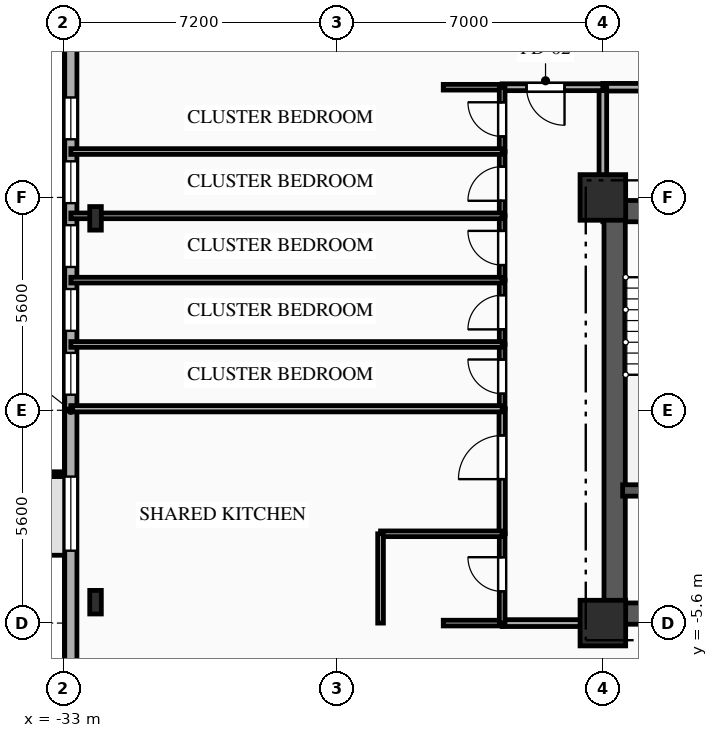
"""IFC4 building model, lengths in metres.
Left out: names, types, materials, properties, quantities, classifications, styles, units other than length and angle.
Written with IfcOpenShell. Run it as: python <this file> out.ifc"""

import sys

from ifc_helpers import new_model, si_unit, direction, frame, frame_2d, origin, origin_2d, place, context, subcontext, project, spatial, rectangle, i_section, extrude, element, fill, save


model = new_model("IFC4")
c1 = context("Model", 3, precision=1e-05, world=origin(), true_north=direction((0.0, 1.0)))
c2 = subcontext(c1, "Body", "Model", "MODEL_VIEW")
j1 = project(units=[si_unit("LENGTHUNIT", "METRE"), si_unit("PLANEANGLEUNIT", "RADIAN")], contexts=[c1])
p1 = place(None, origin())
s1 = spatial("IfcSite", under=j1, at=p1, CompositionType="ELEMENT")
p2 = place(p1, origin())
s2 = spatial("IfcBuilding", under=s1, at=p2, CompositionType="ELEMENT")
p3 = place(p2, frame((0.0, 0.0, 57.15)))
s3 = spatial("IfcBuildingStorey", under=s2, at=p3, CompositionType="ELEMENT", Elevation=57.15)
for number, where, z_axis, x_axis in (
    (1, (-18.8, -5.6, 0.0), (0.0, 0.0, 1.0), (1.0, 0.0, 0.0)),
    (2, (-18.8, 5.6, 0.0), (0.0, 0.0, 1.0), (1.0, 0.0, 0.0)),
):
    element("IfcColumn", number, at=place(p3, frame(where, z_axis=z_axis, x_axis=x_axis)), inside=s3, PredefinedType="COLUMN", context=c2, shape_type="SweptSolid", body=[
        extrude(rectangle(XDim=1.2, YDim=1.2, at=origin_2d()), origin(), (0.0, 0.0, 1.0), 3.35),
    ])
for number, where, z_axis, x_axis in (
    (3, (-32.15, 5.05, 0.0), (0.0, 0.0, 1.0), (1.0, 0.0, 0.0)),
    (4, (-32.15, -5.05, 0.0), (0.0, 0.0, 1.0), (1.0, 0.0, 0.0)),
):
    element("IfcColumn", number, at=place(p3, frame(where, z_axis=z_axis, x_axis=x_axis)), inside=s3, PredefinedType="COLUMN", context=c2, shape_type="SweptSolid", body=[
        extrude(i_section(OverallWidth=0.305, OverallDepth=0.62, WebThickness=0.021, FlangeThickness=0.04, FilletRadius=0.027, at=origin_2d()), origin(), (0.0, 0.0, 1.0), 3.35),
    ])
p4 = place(p3, frame((-32.8, -15.8, 0.0), z_axis=(0.0, 0.0, 1.0), x_axis=(0.0, 1.0, 0.0)))
e5 = element("IfcWall", 5, at=p4, inside=s3, PredefinedType="SOLIDWALL", context=c2, shape_type="SweptSolid", body=[
    extrude(rectangle(XDim=31.6, YDim=0.32, at=frame_2d((15.8, 0.0))), origin(), (0.0, 0.0, 1.0), 3.035),
])
p5 = place(p4, frame((12.105, 0.0, 0.85)))
e6 = element("IfcOpeningElement", 6, at=p5, cuts=e5, PredefinedType="OPENING", context=c2, shape_type="SweptSolid", body=[
    extrude(rectangle(XDim=1.95, YDim=1.85, at=frame_2d((0.975, 0.925))), frame((0.0, 0.17, 0.0), z_axis=(0.0, -1.0, 0.0), x_axis=(1.0, 0.0, 0.0)), (0.0, 0.0, 1.0), 0.34),
])
p6 = place(p4, frame((16.21, 0.0, 0.85)))
e7 = element("IfcOpeningElement", 7, at=p6, cuts=e5, PredefinedType="OPENING", context=c2, shape_type="SweptSolid", body=[
    extrude(rectangle(XDim=1.1, YDim=1.85, at=frame_2d((0.55, 0.925))), frame((0.0, 0.17, 0.0), z_axis=(0.0, -1.0, 0.0), x_axis=(1.0, 0.0, 0.0)), (0.0, 0.0, 1.0), 0.34),
])
p7 = place(p4, frame((17.89, 0.0, 0.85)))
e8 = element("IfcOpeningElement", 8, at=p7, cuts=e5, PredefinedType="OPENING", context=c2, shape_type="SweptSolid", body=[
    extrude(rectangle(XDim=1.1, YDim=1.85, at=frame_2d((0.55, 0.925))), frame((0.0, 0.17, 0.0), z_axis=(0.0, -1.0, 0.0), x_axis=(1.0, 0.0, 0.0)), (0.0, 0.0, 1.0), 0.34),
])
p8 = place(p4, frame((19.57, 0.0, 0.85)))
e9 = element("IfcOpeningElement", 9, at=p8, cuts=e5, PredefinedType="OPENING", context=c2, shape_type="SweptSolid", body=[
    extrude(rectangle(XDim=1.1, YDim=1.85, at=frame_2d((0.55, 0.925))), frame((0.0, 0.17, 0.0), z_axis=(0.0, -1.0, 0.0), x_axis=(1.0, 0.0, 0.0)), (0.0, 0.0, 1.0), 0.34),
])
p9 = place(p4, frame((21.25, 0.0, 0.85)))
e10 = element("IfcOpeningElement", 10, at=p9, cuts=e5, PredefinedType="OPENING", context=c2, shape_type="SweptSolid", body=[
    extrude(rectangle(XDim=1.1, YDim=1.85, at=frame_2d((0.55, 0.925))), frame((0.0, 0.17, 0.0), z_axis=(0.0, -1.0, 0.0), x_axis=(1.0, 0.0, 0.0)), (0.0, 0.0, 1.0), 0.34),
])
p10 = place(p4, frame((22.93, 0.0, 0.85)))
e11 = element("IfcOpeningElement", 11, at=p10, cuts=e5, PredefinedType="OPENING", context=c2, shape_type="SweptSolid", body=[
    extrude(rectangle(XDim=1.1, YDim=1.85, at=frame_2d((0.55, 0.925))), frame((0.0, 0.17, 0.0), z_axis=(0.0, -1.0, 0.0), x_axis=(1.0, 0.0, 0.0)), (0.0, 0.0, 1.0), 0.34),
])
p11 = place(p3, frame((-18.8, 5.24, 0.0), z_axis=(0.0, 0.0, 1.0), x_axis=(1.0, 0.0, 0.0)))
e12 = element("IfcWall", 12, at=p11, inside=s3, PredefinedType="SHEAR", context=c2, shape_type="SweptSolid", body=[
    extrude(rectangle(XDim=9.6, YDim=0.56, at=frame_2d((4.8, 0.0))), origin(), (0.0, 0.0, 1.0), 3.035),
])
p12 = place(p11, frame((1.55, 0.0, 0.0)))
e13 = element("IfcOpeningElement", 13, at=p12, cuts=e12, PredefinedType="OPENING", context=c2, shape_type="SweptSolid", body=[
    extrude(rectangle(XDim=1.1, YDim=2.15, at=frame_2d((0.55, 1.075))), frame((0.0, 0.29, 0.0), z_axis=(0.0, -1.0, 0.0), x_axis=(1.0, 0.0, 0.0)), (0.0, 0.0, 1.0), 0.58),
])
p13 = place(p11, frame((4.775, 0.0, 0.0)))
e14 = element("IfcOpeningElement", 14, at=p13, cuts=e12, PredefinedType="OPENING", context=c2, shape_type="SweptSolid", body=[
    extrude(rectangle(XDim=1.05, YDim=2.1, at=frame_2d((0.525, 1.05))), frame((0.0, 0.29, 0.0), z_axis=(0.0, -1.0, 0.0), x_axis=(1.0, 0.0, 0.0)), (0.0, 0.0, 1.0), 0.58),
])
p14 = place(p3, frame((-18.8, -5.35, 0.0), z_axis=(0.0, 0.0, 1.0), x_axis=(1.0, 0.0, 0.0)))
e15 = element("IfcWall", 15, at=p14, inside=s3, PredefinedType="SHEAR", context=c2, shape_type="SweptSolid", body=[
    extrude(rectangle(XDim=9.6, YDim=0.56, at=frame_2d((4.8, 0.0))), origin(), (0.0, 0.0, 1.0), 3.035),
])
p15 = place(p14, frame((1.05, 0.0, 0.0)))
e16 = element("IfcOpeningElement", 16, at=p15, cuts=e15, PredefinedType="OPENING", context=c2, shape_type="SweptSolid", body=[
    extrude(rectangle(XDim=0.9, YDim=2.1, at=frame_2d((0.45, 1.05))), frame((0.0, 0.29, 0.0), z_axis=(0.0, -1.0, 0.0), x_axis=(1.0, 0.0, 0.0)), (0.0, 0.0, 1.0), 0.58),
])
p16 = place(p3, frame((-18.49, -5.05, 0.0), z_axis=(0.0, 0.0, 1.0), x_axis=(0.0, 1.0, 0.0)))
e17 = element("IfcWall", 17, at=p16, inside=s3, PredefinedType="SHEAR", context=c2, shape_type="SweptSolid", body=[
    extrude(rectangle(XDim=10.1, YDim=0.56, at=frame_2d((5.05, 0.0))), origin(), (0.0, 0.0, 1.0), 3.035),
])
p17 = place(p3, frame((-18.28, -2.11, 0.0), z_axis=(0.0, 0.0, 1.0), x_axis=(1.0, 0.0, 0.0)))
e18 = element("IfcWall", 18, at=p17, inside=s3, PredefinedType="SHEAR", context=c2, shape_type="SweptSolid", body=[
    extrude(rectangle(XDim=3.18, YDim=0.3, at=frame_2d((1.59, 0.0))), origin(), (0.0, 0.0, 1.0), 3.035),
])
p18 = place(p3, frame((-12.0, 8.5, 0.0), z_axis=(0.0, 0.0, 1.0), x_axis=(-1.0, 0.0, 0.0)))
e19 = element("IfcWall", 19, at=p18, inside=s3, PredefinedType="PARTITIONING", context=c2, shape_type="SweptSolid", body=[
    extrude(rectangle(XDim=6.8, YDim=0.2, at=frame_2d((3.4, 0.0))), origin(), (0.0, 0.0, 1.0), 3.035),
])
p19 = place(p18, frame((1.715, 0.0, 0.0)))
e20 = element("IfcOpeningElement", 20, at=p19, cuts=e19, PredefinedType="OPENING", context=c2, shape_type="SweptSolid", body=[
    extrude(rectangle(XDim=1.1, YDim=2.15, at=frame_2d((0.55, 1.075))), frame((0.0, 0.11, 0.0), z_axis=(0.0, -1.0, 0.0), x_axis=(1.0, 0.0, 0.0)), (0.0, 0.0, 1.0), 0.22),
])
p20 = place(p3, frame((-18.8, 8.5, 0.0), z_axis=(0.0, 0.0, 1.0), x_axis=(0.0, -1.0, 0.0)))
e21 = element("IfcWall", 21, at=p20, inside=s3, PredefinedType="PARTITIONING", context=c2, shape_type="SweptSolid", body=[
    extrude(rectangle(XDim=2.9, YDim=0.2, at=frame_2d((1.45, 0.0))), origin(), (0.0, 0.0, 1.0), 2.52),
])
p21 = place(p3, frame((-18.8, 8.5, 0.0), z_axis=(0.0, 0.0, 1.0), x_axis=(-1.0, 0.0, 0.0)))
e22 = element("IfcWall", 22, at=p21, inside=s3, PredefinedType="PARTITIONING", context=c2, shape_type="SweptSolid", body=[
    extrude(rectangle(XDim=2.65, YDim=0.18, at=frame_2d((1.325, 0.0))), origin(), (0.0, 0.0, 1.0), 3.035),
])
p22 = place(p21, frame((1.009, 0.0, 0.0)))
e23 = element("IfcOpeningElement", 23, at=p22, cuts=e22, PredefinedType="OPENING", context=c2, shape_type="SweptSolid", body=[
    extrude(rectangle(XDim=1.0, YDim=2.15, at=frame_2d((0.5, 1.075))), frame((0.0, 0.1, 0.0), z_axis=(0.0, -1.0, 0.0), x_axis=(1.0, 0.0, 0.0)), (0.0, 0.0, 1.0), 0.2),
])
p23 = place(p3, frame((-21.45, 8.5, 0.0), z_axis=(0.0, 0.0, 1.0), x_axis=(-1.0, 0.0, 0.0)))
e24 = element("IfcWall", 24, at=p23, inside=s3, PredefinedType="PARTITIONING", context=c2, shape_type="SweptSolid", body=[
    extrude(rectangle(XDim=1.55, YDim=0.15, at=frame_2d((0.775, 0.0))), origin(), (0.0, 0.0, 1.0), 3.035),
])
p24 = place(p3, frame((-21.45, -5.6, 0.0), z_axis=(0.0, 0.0, 1.0), x_axis=(1.0, 0.0, 0.0)))
e25 = element("IfcWall", 25, at=p24, inside=s3, PredefinedType="PARTITIONING", context=c2, shape_type="SweptSolid", body=[
    extrude(rectangle(XDim=2.65, YDim=0.18, at=frame_2d((1.325, 0.0))), origin(), (0.0, 0.0, 1.0), 3.035),
])
p25 = place(p3, frame((-23.0, -5.6, 0.0), z_axis=(0.0, 0.0, 1.0), x_axis=(1.0, 0.0, 0.0)))
e26 = element("IfcWall", 26, at=p25, inside=s3, PredefinedType="PLUMBINGWALL", context=c2, shape_type="SweptSolid", body=[
    extrude(rectangle(XDim=1.55, YDim=0.15, at=frame_2d((0.775, 0.0))), origin(), (0.0, 0.0, 1.0), 3.035),
])
p26 = place(p3, frame((-21.45, -5.6, 0.0), z_axis=(0.0, 0.0, 1.0), x_axis=(0.0, 1.0, 0.0)))
e27 = element("IfcWall", 27, at=p26, inside=s3, PredefinedType="PLUMBINGWALL", context=c2, shape_type="SweptSolid", body=[
    extrude(rectangle(XDim=2.35, YDim=0.15, at=frame_2d((1.175, 0.0))), origin(), (0.0, 0.0, 1.0), 3.035),
])
p27 = place(p26, frame((0.834, 0.0, 0.0)))
e28 = element("IfcOpeningElement", 28, at=p27, cuts=e27, PredefinedType="OPENING", context=c2, shape_type="SweptSolid", body=[
    extrude(rectangle(XDim=0.9, YDim=2.1, at=frame_2d((0.45, 1.05))), frame((0.0, 0.085, 0.0), z_axis=(0.0, -1.0, 0.0), x_axis=(1.0, 0.0, 0.0)), (0.0, 0.0, 1.0), 0.17),
])
p28 = place(p3, frame((-21.45, -3.25, 0.0), z_axis=(0.0, 0.0, 1.0), x_axis=(0.0, 1.0, 0.0)))
e29 = element("IfcWall", 29, at=p28, inside=s3, PredefinedType="PARTITIONING", context=c2, shape_type="SweptSolid", body=[
    extrude(rectangle(XDim=3.29, YDim=0.165, at=frame_2d((1.645, 0.0))), origin(), (0.0, 0.0, 1.0), 3.035),
])
p29 = place(p28, frame((1.438, 0.0, 0.0)))
e30 = element("IfcOpeningElement", 30, at=p29, cuts=e29, PredefinedType="OPENING", context=c2, shape_type="SweptSolid", body=[
    extrude(rectangle(XDim=1.15, YDim=2.15, at=frame_2d((0.575, 1.075))), frame((0.0, 0.093, 0.0), z_axis=(0.0, -1.0, 0.0), x_axis=(1.0, 0.0, 0.0)), (0.0, 0.0, 1.0), 0.185),
])
p30 = place(p3, frame((-21.45, 0.04, 0.0), z_axis=(0.0, 0.0, 1.0), x_axis=(0.0, 1.0, 0.0)))
e31 = element("IfcWall", 31, at=p30, inside=s3, PredefinedType="PARTITIONING", context=c2, shape_type="SweptSolid", body=[
    extrude(rectangle(XDim=1.692, YDim=0.15, at=frame_2d((0.846, 0.0))), origin(), (0.0, 0.0, 1.0), 3.035),
])
p31 = place(p30, frame((0.396, 0.0, 0.0)))
e32 = element("IfcOpeningElement", 32, at=p31, cuts=e31, PredefinedType="OPENING", context=c2, shape_type="SweptSolid", body=[
    extrude(rectangle(XDim=0.9, YDim=2.1, at=frame_2d((0.45, 1.05))), frame((0.0, 0.085, 0.0), z_axis=(0.0, -1.0, 0.0), x_axis=(1.0, 0.0, 0.0)), (0.0, 0.0, 1.0), 0.17),
])
p32 = place(p3, frame((-21.45, 1.732, 0.0), z_axis=(0.0, 0.0, 1.0), x_axis=(0.0, 1.0, 0.0)))
e33 = element("IfcWall", 33, at=p32, inside=s3, PredefinedType="PARTITIONING", context=c2, shape_type="SweptSolid", body=[
    extrude(rectangle(XDim=1.692, YDim=0.15, at=frame_2d((0.846, 0.0))), origin(), (0.0, 0.0, 1.0), 3.035),
])
p33 = place(p32, frame((0.396, 0.0, 0.0)))
e34 = element("IfcOpeningElement", 34, at=p33, cuts=e33, PredefinedType="OPENING", context=c2, shape_type="SweptSolid", body=[
    extrude(rectangle(XDim=0.9, YDim=2.1, at=frame_2d((0.45, 1.05))), frame((0.0, 0.085, 0.0), z_axis=(0.0, -1.0, 0.0), x_axis=(1.0, 0.0, 0.0)), (0.0, 0.0, 1.0), 0.17),
])
p34 = place(p3, frame((-21.45, 3.424, 0.0), z_axis=(0.0, 0.0, 1.0), x_axis=(0.0, 1.0, 0.0)))
e35 = element("IfcWall", 35, at=p34, inside=s3, PredefinedType="PARTITIONING", context=c2, shape_type="SweptSolid", body=[
    extrude(rectangle(XDim=1.692, YDim=0.15, at=frame_2d((0.846, 0.0))), origin(), (0.0, 0.0, 1.0), 3.035),
])
p35 = place(p34, frame((0.396, 0.0, 0.0)))
e36 = element("IfcOpeningElement", 36, at=p35, cuts=e35, PredefinedType="OPENING", context=c2, shape_type="SweptSolid", body=[
    extrude(rectangle(XDim=0.9, YDim=2.1, at=frame_2d((0.45, 1.05))), frame((0.0, 0.085, 0.0), z_axis=(0.0, -1.0, 0.0), x_axis=(1.0, 0.0, 0.0)), (0.0, 0.0, 1.0), 0.17),
])
p36 = place(p3, frame((-21.45, 5.116, 0.0), z_axis=(0.0, 0.0, 1.0), x_axis=(0.0, 1.0, 0.0)))
e37 = element("IfcWall", 37, at=p36, inside=s3, PredefinedType="PARTITIONING", context=c2, shape_type="SweptSolid", body=[
    extrude(rectangle(XDim=1.692, YDim=0.15, at=frame_2d((0.846, 0.0))), origin(), (0.0, 0.0, 1.0), 3.035),
])
p37 = place(p36, frame((0.396, 0.0, 0.0)))
e38 = element("IfcOpeningElement", 38, at=p37, cuts=e37, PredefinedType="OPENING", context=c2, shape_type="SweptSolid", body=[
    extrude(rectangle(XDim=0.9, YDim=2.1, at=frame_2d((0.45, 1.05))), frame((0.0, 0.085, 0.0), z_axis=(0.0, -1.0, 0.0), x_axis=(1.0, 0.0, 0.0)), (0.0, 0.0, 1.0), 0.17),
])
p38 = place(p3, frame((-21.45, 6.808, 0.0), z_axis=(0.0, 0.0, 1.0), x_axis=(0.0, 1.0, 0.0)))
e39 = element("IfcWall", 39, at=p38, inside=s3, PredefinedType="PARTITIONING", context=c2, shape_type="SweptSolid", body=[
    extrude(rectangle(XDim=1.692, YDim=0.15, at=frame_2d((0.846, 0.0))), origin(), (0.0, 0.0, 1.0), 3.035),
])
p39 = place(p38, frame((0.396, 0.0, 0.0)))
e40 = element("IfcOpeningElement", 40, at=p39, cuts=e39, PredefinedType="OPENING", context=c2, shape_type="SweptSolid", body=[
    extrude(rectangle(XDim=0.9, YDim=2.1, at=frame_2d((0.45, 1.05))), frame((0.0, 0.085, 0.0), z_axis=(0.0, -1.0, 0.0), x_axis=(1.0, 0.0, 0.0)), (0.0, 0.0, 1.0), 0.17),
])
p40 = place(p3, frame((-24.65, -3.25, 0.0), z_axis=(0.0, 0.0, 1.0), x_axis=(1.0, 0.0, 0.0)))
e41 = element("IfcWall", 41, at=p40, inside=s3, PredefinedType="PLUMBINGWALL", context=c2, shape_type="SweptSolid", body=[
    extrude(rectangle(XDim=3.2, YDim=0.15, at=frame_2d((1.6, 0.0))), origin(), (0.0, 0.0, 1.0), 2.52),
])
p41 = place(p3, frame((-24.65, -5.6, 0.0), z_axis=(0.0, 0.0, 1.0), x_axis=(0.0, 1.0, 0.0)))
e42 = element("IfcWall", 42, at=p41, inside=s3, PredefinedType="PLUMBINGWALL", context=c2, shape_type="SweptSolid", body=[
    extrude(rectangle(XDim=2.35, YDim=0.15, at=frame_2d((1.175, 0.0))), origin(), (0.0, 0.0, 1.0), 3.035),
])
p42 = place(p3, frame((-32.8, 0.04, 0.0), z_axis=(0.0, 0.0, 1.0), x_axis=(1.0, 0.0, 0.0)))
e43 = element("IfcWall", 43, at=p42, inside=s3, PredefinedType="PARTITIONING", context=c2, shape_type="SweptSolid", body=[
    extrude(rectangle(XDim=11.35, YDim=0.165, at=frame_2d((5.675, 0.0))), origin(), (0.0, 0.0, 1.0), 3.035),
])
p43 = place(p3, frame((-32.8, 1.732, 0.0), z_axis=(0.0, 0.0, 1.0), x_axis=(1.0, 0.0, 0.0)))
e44 = element("IfcWall", 44, at=p43, inside=s3, PredefinedType="PARTITIONING", context=c2, shape_type="SweptSolid", body=[
    extrude(rectangle(XDim=11.35, YDim=0.15, at=frame_2d((5.675, 0.0))), origin(), (0.0, 0.0, 1.0), 3.035),
])
for number, where, z_axis, x_axis in (
    (45, (-32.8, 3.424, 0.0), (0.0, 0.0, 1.0), (1.0, 0.0, 0.0)),
    (46, (-32.8, 5.116, 0.0), (0.0, 0.0, 1.0), (1.0, 0.0, 0.0)),
):
    element("IfcWall", number, at=place(p3, frame(where, z_axis=z_axis, x_axis=x_axis)), inside=s3, PredefinedType="PARTITIONING", context=c2, shape_type="SweptSolid", body=[
        extrude(rectangle(XDim=11.35, YDim=0.15, at=frame_2d((5.675, 0.0))), origin(), (0.0, 0.0, 1.0), 2.52),
    ])
p44 = place(p3, frame((-32.8, 6.808, 0.0), z_axis=(0.0, 0.0, 1.0), x_axis=(1.0, 0.0, 0.0)))
e47 = element("IfcWall", 47, at=p44, inside=s3, PredefinedType="PARTITIONING", context=c2, shape_type="SweptSolid", body=[
    extrude(rectangle(XDim=11.35, YDim=0.15, at=frame_2d((5.675, 0.0))), origin(), (0.0, 0.0, 1.0), 3.035),
])
p45 = place(p5, origin())
e48 = element("IfcWindow", 48, at=p45, inside=s3, PartitioningType="SINGLE_PANEL", PredefinedType="WINDOW", context=c2, shape_type="SweptSolid", body=[
    extrude(rectangle(XDim=1.95, YDim=1.85, at=frame_2d((0.975, 0.925))), frame((0.0, 0.03, 0.0), z_axis=(0.0, -1.0, 0.0), x_axis=(1.0, 0.0, 0.0)), (0.0, 0.0, 1.0), 0.06),
])
fill(e6, e48)
p46 = place(p6, origin())
e49 = element("IfcWindow", 49, at=p46, inside=s3, PartitioningType="SINGLE_PANEL", PredefinedType="WINDOW", context=c2, shape_type="SweptSolid", body=[
    extrude(rectangle(XDim=1.1, YDim=1.85, at=frame_2d((0.55, 0.925))), frame((0.0, 0.03, 0.0), z_axis=(0.0, -1.0, 0.0), x_axis=(1.0, 0.0, 0.0)), (0.0, 0.0, 1.0), 0.06),
])
fill(e7, e49)
p47 = place(p7, origin())
e50 = element("IfcWindow", 50, at=p47, inside=s3, PartitioningType="SINGLE_PANEL", PredefinedType="WINDOW", context=c2, shape_type="SweptSolid", body=[
    extrude(rectangle(XDim=1.1, YDim=1.85, at=frame_2d((0.55, 0.925))), frame((0.0, 0.03, 0.0), z_axis=(0.0, -1.0, 0.0), x_axis=(1.0, 0.0, 0.0)), (0.0, 0.0, 1.0), 0.06),
])
fill(e8, e50)
p48 = place(p8, origin())
e51 = element("IfcWindow", 51, at=p48, inside=s3, PartitioningType="SINGLE_PANEL", PredefinedType="WINDOW", context=c2, shape_type="SweptSolid", body=[
    extrude(rectangle(XDim=1.1, YDim=1.85, at=frame_2d((0.55, 0.925))), frame((0.0, 0.03, 0.0), z_axis=(0.0, -1.0, 0.0), x_axis=(1.0, 0.0, 0.0)), (0.0, 0.0, 1.0), 0.06),
])
fill(e9, e51)
p49 = place(p9, origin())
e52 = element("IfcWindow", 52, at=p49, inside=s3, PartitioningType="SINGLE_PANEL", PredefinedType="WINDOW", context=c2, shape_type="SweptSolid", body=[
    extrude(rectangle(XDim=1.1, YDim=1.85, at=frame_2d((0.55, 0.925))), frame((0.0, 0.03, 0.0), z_axis=(0.0, -1.0, 0.0), x_axis=(1.0, 0.0, 0.0)), (0.0, 0.0, 1.0), 0.06),
])
fill(e10, e52)
p50 = place(p10, origin())
e53 = element("IfcWindow", 53, at=p50, inside=s3, PartitioningType="SINGLE_PANEL", PredefinedType="WINDOW", context=c2, shape_type="SweptSolid", body=[
    extrude(rectangle(XDim=1.1, YDim=1.85, at=frame_2d((0.55, 0.925))), frame((0.0, 0.03, 0.0), z_axis=(0.0, -1.0, 0.0), x_axis=(1.0, 0.0, 0.0)), (0.0, 0.0, 1.0), 0.06),
])
fill(e11, e53)
p51 = place(p22, origin())
e54 = element("IfcDoor", 54, at=p51, inside=s3, OperationType="SINGLE_SWING_LEFT", PredefinedType="DOOR", context=c2, shape_type="SweptSolid", body=[
    extrude(rectangle(XDim=1.0, YDim=2.15, at=frame_2d((0.5, 1.075))), frame((0.0, 0.025, 0.0), z_axis=(0.0, -1.0, 0.0), x_axis=(1.0, 0.0, 0.0)), (0.0, 0.0, 1.0), 0.05),
])
fill(e23, e54)
p52 = place(p27, origin())
e55 = element("IfcDoor", 55, at=p52, inside=s3, OperationType="SINGLE_SWING_RIGHT", PredefinedType="DOOR", context=c2, shape_type="SweptSolid", body=[
    extrude(rectangle(XDim=0.9, YDim=2.1, at=frame_2d((0.45, 1.05))), frame((0.0, 0.025, 0.0), z_axis=(0.0, -1.0, 0.0), x_axis=(1.0, 0.0, 0.0)), (0.0, 0.0, 1.0), 0.05),
])
fill(e28, e55)
p53 = place(p29, origin())
e56 = element("IfcDoor", 56, at=p53, inside=s3, OperationType="SINGLE_SWING_LEFT", PredefinedType="DOOR", context=c2, shape_type="SweptSolid", body=[
    extrude(rectangle(XDim=1.15, YDim=2.15, at=frame_2d((0.575, 1.075))), frame((0.0, 0.025, 0.0), z_axis=(0.0, -1.0, 0.0), x_axis=(1.0, 0.0, 0.0)), (0.0, 0.0, 1.0), 0.05),
])
fill(e30, e56)
p54 = place(p31, origin())
e57 = element("IfcDoor", 57, at=p54, inside=s3, OperationType="SINGLE_SWING_RIGHT", PredefinedType="DOOR", context=c2, shape_type="SweptSolid", body=[
    extrude(rectangle(XDim=0.9, YDim=2.1, at=frame_2d((0.45, 1.05))), frame((0.0, 0.025, 0.0), z_axis=(0.0, -1.0, 0.0), x_axis=(1.0, 0.0, 0.0)), (0.0, 0.0, 1.0), 0.05),
])
fill(e32, e57)
p55 = place(p33, origin())
e58 = element("IfcDoor", 58, at=p55, inside=s3, OperationType="SINGLE_SWING_LEFT", PredefinedType="DOOR", context=c2, shape_type="SweptSolid", body=[
    extrude(rectangle(XDim=0.9, YDim=2.1, at=frame_2d((0.45, 1.05))), frame((0.0, 0.025, 0.0), z_axis=(0.0, -1.0, 0.0), x_axis=(1.0, 0.0, 0.0)), (0.0, 0.0, 1.0), 0.05),
])
fill(e34, e58)
p56 = place(p35, origin())
e59 = element("IfcDoor", 59, at=p56, inside=s3, OperationType="SINGLE_SWING_RIGHT", PredefinedType="DOOR", context=c2, shape_type="SweptSolid", body=[
    extrude(rectangle(XDim=0.9, YDim=2.1, at=frame_2d((0.45, 1.05))), frame((0.0, 0.025, 0.0), z_axis=(0.0, -1.0, 0.0), x_axis=(1.0, 0.0, 0.0)), (0.0, 0.0, 1.0), 0.05),
])
fill(e36, e59)
p57 = place(p37, origin())
e60 = element("IfcDoor", 60, at=p57, inside=s3, OperationType="SINGLE_SWING_LEFT", PredefinedType="DOOR", context=c2, shape_type="SweptSolid", body=[
    extrude(rectangle(XDim=0.9, YDim=2.1, at=frame_2d((0.45, 1.05))), frame((0.0, 0.025, 0.0), z_axis=(0.0, -1.0, 0.0), x_axis=(1.0, 0.0, 0.0)), (0.0, 0.0, 1.0), 0.05),
])
fill(e38, e60)
p58 = place(p39, origin())
e61 = element("IfcDoor", 61, at=p58, inside=s3, OperationType="SINGLE_SWING_RIGHT", PredefinedType="DOOR", context=c2, shape_type="SweptSolid", body=[
    extrude(rectangle(XDim=0.9, YDim=2.1, at=frame_2d((0.45, 1.05))), frame((0.0, 0.025, 0.0), z_axis=(0.0, -1.0, 0.0), x_axis=(1.0, 0.0, 0.0)), (0.0, 0.0, 1.0), 0.05),
])
fill(e40, e61)
save(model, sys.argv[1])
